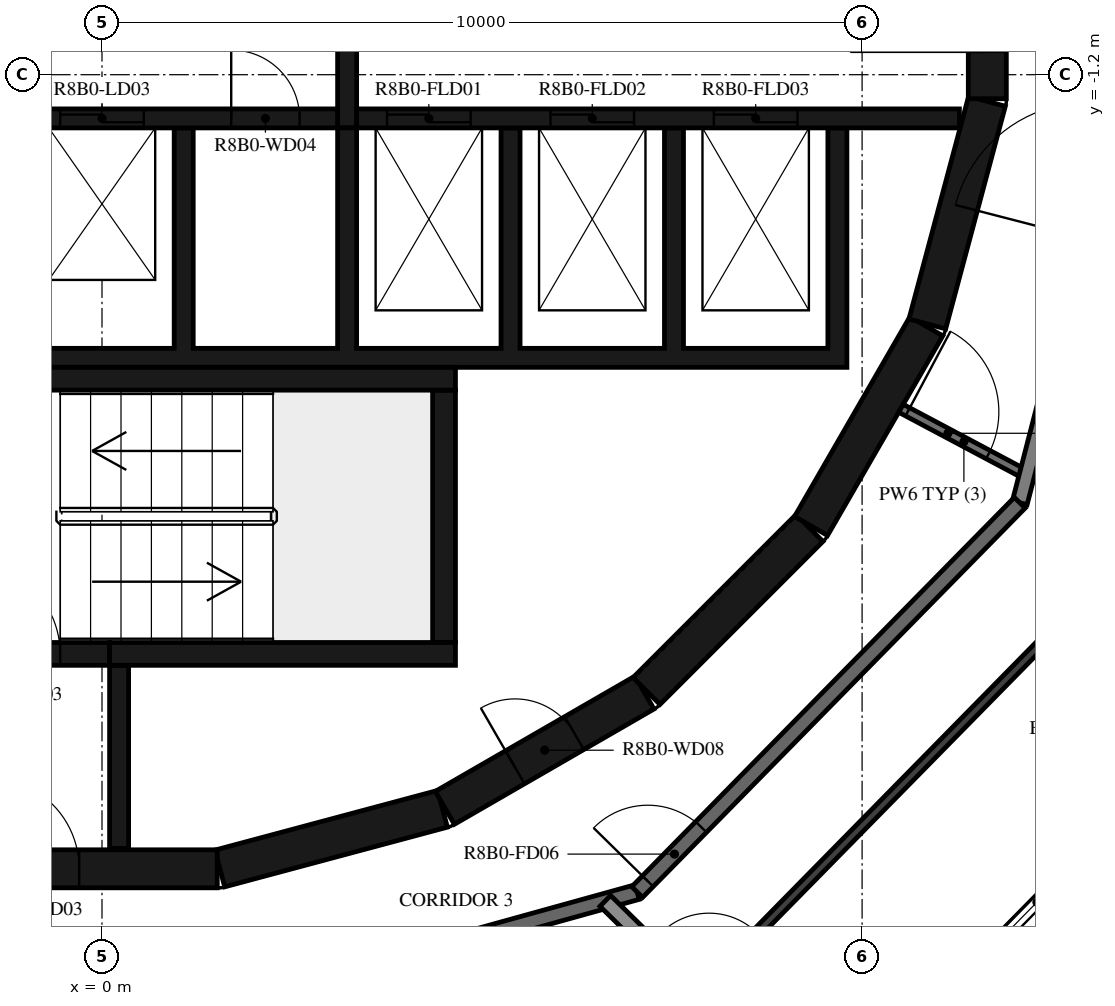
"""IFC4 building model, lengths in metres.
Left out: names, types, materials, properties, quantities, classifications, styles, units other than length and angle.
Written with IfcOpenShell. Run it as: python <this file> out.ifc"""

import sys

from ifc_helpers import new_model, si_unit, direction, frame, frame_2d, origin, place, context, subcontext, project, spatial, polyline, rectangle, outline, extrude, element, fill, save


model = new_model("IFC4")
c1 = context("Model", 3, precision=1e-05, world=origin(), true_north=direction((0.0, 1.0)))
c2 = subcontext(c1, "Body", "Model", "MODEL_VIEW")
j1 = project(units=[si_unit("LENGTHUNIT", "METRE"), si_unit("PLANEANGLEUNIT", "RADIAN")], contexts=[c1])
p1 = place(None, origin())
s1 = spatial("IfcSite", under=j1, at=p1, CompositionType="ELEMENT")
p2 = place(p1, origin())
s2 = spatial("IfcBuilding", under=s1, at=p2, CompositionType="ELEMENT")
p3 = place(p2, frame((0.0, 0.0, 312.2)))
s3 = spatial("IfcBuildingStorey", under=s2, at=p3, CompositionType="ELEMENT", Elevation=312.2)
p4 = place(p3, frame((1.55, -11.643, 0.0), z_axis=(0.0, 0.0, 1.0), x_axis=(0.965948410781, 0.258734743916, 0.0)))
e1 = element("IfcWall", 1, at=p4, inside=s3, PredefinedType="SHEAR", context=c2, shape_type="SweptSolid", body=[
    extrude(rectangle(XDim=3.033, YDim=0.5, at=frame_2d((1.516, 0.0))), origin(), (0.0, 0.0, 1.0), 3.12),
])
p5 = place(p3, frame((4.51, -10.845, 0.0), z_axis=(0.0, 0.0, 1.0), x_axis=(0.865975092491, 0.500087131594, 0.0)))
e2 = element("IfcWall", 2, at=p5, inside=s3, PredefinedType="SHEAR", context=c2, shape_type="SweptSolid", body=[
    extrude(rectangle(XDim=3.033, YDim=0.5, at=frame_2d((1.516, 0.0))), origin(), (0.0, 0.0, 1.0), 3.12),
])
p6 = place(p5, frame((1.066, 0.0, 0.0)))
e3 = element("IfcOpeningElement", 3, at=p6, cuts=e2, PredefinedType="OPENING", context=c2, shape_type="SweptSolid", body=[
    extrude(rectangle(XDim=0.9, YDim=2.1, at=frame_2d((0.45, 1.05))), frame((0.0, 0.26, 0.0), z_axis=(0.0, -1.0, 0.0), x_axis=(1.0, 0.0, 0.0)), (0.0, 0.0, 1.0), 0.52),
])
p7 = place(p3, frame((7.164, -9.308, 0.0), z_axis=(0.0, 0.0, 1.0), x_axis=(0.707106781187, 0.707106781187, 0.0)))
e4 = element("IfcWall", 4, at=p7, inside=s3, PredefinedType="SHEAR", context=c2, shape_type="SweptSolid", body=[
    extrude(rectangle(XDim=3.032, YDim=0.5, at=frame_2d((1.516, 0.0))), origin(), (0.0, 0.0, 1.0), 3.12),
])
for number, where, z_axis, x_axis in (
    (5, (9.329, -7.137, 0.0), (0.0, 0.0, 1.0), (0.5, 0.866, 0.0)),
    (6, (10.858, -4.479, 0.0), (0.0, 0.0, 1.0), (0.259, 0.966, 0.0)),
):
    element("IfcWall", number, at=place(p3, frame(where, z_axis=z_axis, x_axis=x_axis)), inside=s3, PredefinedType="SHEAR", context=c2, shape_type="SweptSolid", body=[
        extrude(rectangle(XDim=3.033, YDim=0.5, at=frame_2d((1.516, 0.0))), origin(), (0.0, 0.0, 1.0), 3.12),
    ])
p8 = place(p3, frame((11.647, -1.516, 0.0), z_axis=(0.0, 0.0, 1.0), x_axis=(0.0, 1.0, 0.0)))
e7 = element("IfcWall", 7, at=p8, inside=s3, PredefinedType="SHEAR", context=c2, shape_type="SweptSolid", body=[
    extrude(rectangle(XDim=3.033, YDim=0.5, at=frame_2d((1.516, 0.0))), origin(), (0.0, 0.0, 1.0), 3.12),
])
p9 = place(p8, frame((0.616, 0.0, 0.0)))
e8 = element("IfcOpeningElement", 8, at=p9, cuts=e7, PredefinedType="OPENING", context=c2, shape_type="SweptSolid", body=[
    extrude(rectangle(XDim=1.8, YDim=2.1, at=frame_2d((0.9, 1.05))), frame((0.0, 0.26, 0.0), z_axis=(0.0, -1.0, 0.0), x_axis=(1.0, 0.0, 0.0)), (0.0, 0.0, 1.0), 0.52),
])
p10 = place(p3, frame((-1.516, -11.647, 0.0), z_axis=(0.0, 0.0, 1.0), x_axis=(1.0, 0.0, 0.0)))
e9 = element("IfcWall", 9, at=p10, inside=s3, PredefinedType="SHEAR", context=c2, shape_type="SweptSolid", body=[
    extrude(rectangle(XDim=3.033, YDim=0.5, at=frame_2d((1.516, 0.0))), origin(), (0.0, 0.0, 1.0), 3.12),
])
p11 = place(p10, frame((0.016, 0.0, 0.0)))
e10 = element("IfcOpeningElement", 10, at=p11, cuts=e9, PredefinedType="OPENING", context=c2, shape_type="SweptSolid", body=[
    extrude(rectangle(XDim=1.2, YDim=2.1, at=frame_2d((0.6, 1.05))), frame((0.0, 0.26, 0.0), z_axis=(0.0, -1.0, 0.0), x_axis=(1.0, 0.0, 0.0)), (0.0, 0.0, 1.0), 0.52),
])
p12 = place(p3, frame((-2.4, -5.2, 0.0), z_axis=(0.0, 0.0, 1.0), x_axis=(1.0, 0.0, 0.0)))
e11 = element("IfcWall", 11, at=p12, inside=s3, PredefinedType="SHEAR", context=c2, shape_type="SweptSolid", body=[
    extrude(rectangle(XDim=7.05, YDim=0.3, at=frame_2d((3.525, 0.0))), origin(), (0.0, 0.0, 1.0), 3.12),
])
p13 = place(p3, frame((4.5, -8.67, 0.0), z_axis=(0.0, 0.0, 1.0), x_axis=(0.0, 1.0, 0.0)))
e12 = element("IfcWall", 12, at=p13, inside=s3, PredefinedType="SHEAR", context=c2, shape_type="SweptSolid", body=[
    extrude(rectangle(XDim=3.32, YDim=0.3, at=frame_2d((1.66, 0.0))), origin(), (0.0, 0.0, 1.0), 3.12),
])
p14 = place(p3, frame((0.1, -8.82, 0.0), z_axis=(0.0, 0.0, 1.0), x_axis=(1.0, 0.0, 0.0)))
e13 = element("IfcWall", 13, at=p14, inside=s3, PredefinedType="SHEAR", context=c2, shape_type="SweptSolid", body=[
    extrude(rectangle(XDim=4.55, YDim=0.3, at=frame_2d((2.275, 0.0))), origin(), (0.0, 0.0, 1.0), 3.12),
])
p15 = place(p3, frame((-2.4, -8.82, 0.0), z_axis=(0.0, 0.0, 1.0), x_axis=(1.0, 0.0, 0.0)))
e14 = element("IfcWall", 14, at=p15, inside=s3, PredefinedType="SHEAR", context=c2, shape_type="SweptSolid", body=[
    extrude(rectangle(XDim=2.5, YDim=0.3, at=frame_2d((1.25, 0.0))), origin(), (0.0, 0.0, 1.0), 3.12),
])
p16 = place(p15, frame((0.65, 0.0, 0.0)))
e15 = element("IfcOpeningElement", 15, at=p16, cuts=e14, PredefinedType="OPENING", context=c2, shape_type="SweptSolid", body=[
    extrude(rectangle(XDim=1.2, YDim=2.1, at=frame_2d((0.6, 1.05))), frame((0.0, 0.16, 0.0), z_axis=(0.0, -1.0, 0.0), x_axis=(1.0, 0.0, 0.0)), (0.0, 0.0, 1.0), 0.32),
])
p17 = place(p3, frame((0.225, -8.97, 0.0), z_axis=(0.0, 0.0, 1.0), x_axis=(0.0, -1.0, 0.0)))
e16 = element("IfcWall", 16, at=p17, inside=s3, PredefinedType="SHEAR", context=c2, shape_type="SweptSolid", body=[
    extrude(rectangle(XDim=2.41, YDim=0.25, at=frame_2d((1.205, 0.0))), origin(), (0.0, 0.0, 1.0), 3.12),
])
p18 = place(p3, origin())
e17 = element("IfcWall", 17, at=p18, inside=s3, PredefinedType="SHEAR", context=c2, shape_type="SweptSolid", body=[
    extrude(outline(polyline([(9.8, -5.05), (9.8, -4.8), (9.8, -1.9), (9.55, -1.9), (9.55, -4.8), (7.65, -4.8), (7.65, -1.9), (7.4, -1.9), (7.4, -4.8), (5.5, -4.8), (5.5, -1.9), (5.25, -1.9), (5.25, -4.8), (3.35, -4.8), (3.35, -1.9), (3.1, -1.9), (3.1, -4.8), (1.2, -4.8), (1.2, -1.9), (0.95, -1.9), (0.95, -4.8), (-0.95, -4.8), (-0.95, -1.9), (-1.2, -1.9), (-1.2, -4.8), (-3.1, -4.8), (-3.1, -1.9), (-3.35, -1.9), (-3.35, -4.8), (-5.25, -4.8), (-5.25, -1.9), (-5.5, -1.9), (-5.5, -4.8), (-9.55, -4.8), (-9.55, -1.9), (-9.8, -1.9), (-9.8, -4.8), (-9.8, -5.05), (9.8, -5.05)])), origin(), (0.0, 0.0, 1.0), 3.12),
])
p19 = place(p3, frame((-11.28, -1.775, 0.0), z_axis=(0.0, 0.0, 1.0), x_axis=(1.0, 0.0, 0.0)))
e18 = element("IfcWall", 18, at=p19, inside=s3, PredefinedType="SHEAR", context=c2, shape_type="SweptSolid", body=[
    extrude(rectangle(XDim=14.38, YDim=0.25, at=frame_2d((7.19, 0.0))), origin(), (0.0, 0.0, 1.0), 3.12),
])
p20 = place(p19, frame((6.43, 0.0, 0.0)))
e19 = element("IfcOpeningElement", 19, at=p20, cuts=e18, PredefinedType="OPENING", context=c2, shape_type="SweptSolid", body=[
    extrude(rectangle(XDim=1.1, YDim=2.1, at=frame_2d((0.55, 1.05))), frame((0.0, 0.135, 0.0), z_axis=(0.0, -1.0, 0.0), x_axis=(1.0, 0.0, 0.0)), (0.0, 0.0, 1.0), 0.27),
])
p21 = place(p19, frame((8.58, 0.0, 0.0)))
e20 = element("IfcOpeningElement", 20, at=p21, cuts=e18, PredefinedType="OPENING", context=c2, shape_type="SweptSolid", body=[
    extrude(rectangle(XDim=1.1, YDim=2.1, at=frame_2d((0.55, 1.05))), frame((0.0, 0.135, 0.0), z_axis=(0.0, -1.0, 0.0), x_axis=(1.0, 0.0, 0.0)), (0.0, 0.0, 1.0), 0.27),
])
p22 = place(p19, frame((10.73, 0.0, 0.0)))
e21 = element("IfcOpeningElement", 21, at=p22, cuts=e18, PredefinedType="OPENING", context=c2, shape_type="SweptSolid", body=[
    extrude(rectangle(XDim=1.1, YDim=2.1, at=frame_2d((0.55, 1.05))), frame((0.0, 0.135, 0.0), z_axis=(0.0, -1.0, 0.0), x_axis=(1.0, 0.0, 0.0)), (0.0, 0.0, 1.0), 0.27),
])
p23 = place(p19, frame((3.305, 0.0, 0.0)))
e22 = element("IfcOpeningElement", 22, at=p23, cuts=e18, PredefinedType="OPENING", context=c2, shape_type="SweptSolid", body=[
    extrude(rectangle(XDim=0.9, YDim=2.1, at=frame_2d((0.45, 1.05))), frame((0.0, 0.135, 0.0), z_axis=(0.0, -1.0, 0.0), x_axis=(1.0, 0.0, 0.0)), (0.0, 0.0, 1.0), 0.27),
])
p24 = place(p19, frame((12.98, 0.0, 0.0)))
e23 = element("IfcOpeningElement", 23, at=p24, cuts=e18, PredefinedType="OPENING", context=c2, shape_type="SweptSolid", body=[
    extrude(rectangle(XDim=0.9, YDim=2.1, at=frame_2d((0.45, 1.05))), frame((0.0, 0.135, 0.0), z_axis=(0.0, -1.0, 0.0), x_axis=(1.0, 0.0, 0.0)), (0.0, 0.0, 1.0), 0.27),
])
p25 = place(p3, frame((3.35, -1.775, 0.0), z_axis=(0.0, 0.0, 1.0), x_axis=(1.0, 0.0, 0.0)))
e24 = element("IfcWall", 24, at=p25, inside=s3, PredefinedType="SHEAR", context=c2, shape_type="SweptSolid", body=[
    extrude(rectangle(XDim=7.93, YDim=0.25, at=frame_2d((3.965, 0.0))), origin(), (0.0, 0.0, 1.0), 3.12),
])
p26 = place(p25, frame((0.4, 0.0, 0.0)))
e25 = element("IfcOpeningElement", 25, at=p26, cuts=e24, PredefinedType="OPENING", context=c2, shape_type="SweptSolid", body=[
    extrude(rectangle(XDim=1.1, YDim=2.4, at=frame_2d((0.55, 1.2))), frame((0.0, 0.135, 0.0), z_axis=(0.0, -1.0, 0.0), x_axis=(1.0, 0.0, 0.0)), (0.0, 0.0, 1.0), 0.27),
])
p27 = place(p25, frame((2.55, 0.0, 0.0)))
e26 = element("IfcOpeningElement", 26, at=p27, cuts=e24, PredefinedType="OPENING", context=c2, shape_type="SweptSolid", body=[
    extrude(rectangle(XDim=1.1, YDim=2.4, at=frame_2d((0.55, 1.2))), frame((0.0, 0.135, 0.0), z_axis=(0.0, -1.0, 0.0), x_axis=(1.0, 0.0, 0.0)), (0.0, 0.0, 1.0), 0.27),
])
p28 = place(p25, frame((4.7, 0.0, 0.0)))
e27 = element("IfcOpeningElement", 27, at=p28, cuts=e24, PredefinedType="OPENING", context=c2, shape_type="SweptSolid", body=[
    extrude(rectangle(XDim=1.1, YDim=2.4, at=frame_2d((0.55, 1.2))), frame((0.0, 0.135, 0.0), z_axis=(0.0, -1.0, 0.0), x_axis=(1.0, 0.0, 0.0)), (0.0, 0.0, 1.0), 0.27),
])
p29 = place(p3, frame((3.225, -1.9, 0.0), z_axis=(0.0, 0.0, 1.0), x_axis=(0.0, 1.0, 0.0)))
e28 = element("IfcWall", 28, at=p29, inside=s3, PredefinedType="SHEAR", context=c2, shape_type="SweptSolid", body=[
    extrude(rectangle(XDim=3.8, YDim=0.25, at=frame_2d((1.9, 0.0))), origin(), (0.0, 0.0, 1.0), 3.12),
])
p30 = place(p3, frame((10.511, -5.589, 0.0), z_axis=(0.0, 0.0, 1.0), x_axis=(0.882957311919, -0.469453283437, 0.0)))
e29 = element("IfcWall", 29, at=p30, inside=s3, PredefinedType="PARTITIONING", context=c2, shape_type="SweptSolid", body=[
    extrude(rectangle(XDim=1.876, YDim=0.12, at=frame_2d((0.938, 0.0))), origin(), (0.0, 0.0, 1.0), 3.12),
])
p31 = place(p30, frame((0.1, 0.0, 0.0)))
e30 = element("IfcOpeningElement", 30, at=p31, cuts=e29, PredefinedType="OPENING", context=c2, shape_type="SweptSolid", body=[
    extrude(rectangle(XDim=1.2, YDim=2.1, at=frame_2d((0.6, 1.05))), frame((0.0, 0.07, 0.0), z_axis=(0.0, -1.0, 0.0), x_axis=(1.0, 0.0, 0.0)), (0.0, 0.0, 1.0), 0.14),
])
p32 = place(p3, frame((12.074, -6.831, 0.0), z_axis=(0.0, 0.0, 1.0), x_axis=(0.250391063186, 0.968144780225, 0.0)))
e31 = element("IfcWall", 31, at=p32, inside=s3, PredefinedType="STANDARD", context=c2, shape_type="SweptSolid", body=[
    extrude(rectangle(XDim=7.181, YDim=0.2, at=frame_2d((3.591, 0.0))), origin(), (0.0, 0.0, 1.0), 3.12),
])
p33 = place(p32, frame((3.581, 0.0, 0.0)))
e32 = element("IfcOpeningElement", 32, at=p33, cuts=e31, PredefinedType="OPENING", context=c2, shape_type="SweptSolid", body=[
    extrude(rectangle(XDim=1.8, YDim=2.1, at=frame_2d((0.9, 1.05))), frame((0.0, 0.11, 0.0), z_axis=(0.0, -1.0, 0.0), x_axis=(1.0, 0.0, 0.0)), (0.0, 0.0, 1.0), 0.22),
])
p34 = place(p3, frame((-6.831, -12.074, 0.0), z_axis=(0.0, 0.0, 1.0), x_axis=(0.968144780225, -0.250391063186, 0.0)))
e33 = element("IfcWall", 33, at=p34, inside=s3, PredefinedType="STANDARD", context=c2, shape_type="SweptSolid", body=[
    extrude(rectangle(XDim=7.181, YDim=0.2, at=frame_2d((3.591, 0.0))), origin(), (0.0, 0.0, 1.0), 3.12),
])
p35 = place(p34, frame((2.39, 0.0, 0.0)))
e34 = element("IfcOpeningElement", 34, at=p35, cuts=e33, PredefinedType="OPENING", context=c2, shape_type="SweptSolid", body=[
    extrude(rectangle(XDim=1.0, YDim=2.1, at=frame_2d((0.5, 1.05))), frame((0.0, 0.11, 0.0), z_axis=(0.0, -1.0, 0.0), x_axis=(1.0, 0.0, 0.0)), (0.0, 0.0, 1.0), 0.22),
])
p36 = place(p34, frame((5.69, 0.0, 0.0)))
e35 = element("IfcOpeningElement", 35, at=p36, cuts=e33, PredefinedType="OPENING", context=c2, shape_type="SweptSolid", body=[
    extrude(rectangle(XDim=1.0, YDim=2.1, at=frame_2d((0.5, 1.05))), frame((0.0, 0.11, 0.0), z_axis=(0.0, -1.0, 0.0), x_axis=(1.0, 0.0, 0.0)), (0.0, 0.0, 1.0), 0.22),
])
p37 = place(p3, frame((0.121, -13.872, 0.0), z_axis=(0.0, 0.0, 1.0), x_axis=(0.963625960674, 0.267254575108, 0.0)))
e36 = element("IfcWall", 36, at=p37, inside=s3, PredefinedType="STANDARD", context=c2, shape_type="SweptSolid", body=[
    extrude(rectangle(XDim=7.181, YDim=0.2, at=frame_2d((3.591, 0.0))), origin(), (0.0, 0.0, 1.0), 3.12),
])
p38 = place(p3, frame((7.041, -11.953, 0.0), z_axis=(0.0, 0.0, 1.0), x_axis=(0.70090916255, 0.713250549143, 0.0)))
e37 = element("IfcWall", 37, at=p38, inside=s3, PredefinedType="STANDARD", context=c2, shape_type="SweptSolid", body=[
    extrude(rectangle(XDim=7.181, YDim=0.2, at=frame_2d((3.59, 0.0))), origin(), (0.0, 0.0, 1.0), 3.12),
])
p39 = place(p38, frame((0.2, 0.0, 0.0)))
e38 = element("IfcOpeningElement", 38, at=p39, cuts=e37, PredefinedType="OPENING", context=c2, shape_type="SweptSolid", body=[
    extrude(rectangle(XDim=1.0, YDim=2.1, at=frame_2d((0.5, 1.05))), frame((0.0, 0.11, 0.0), z_axis=(0.0, -1.0, 0.0), x_axis=(1.0, 0.0, 0.0)), (0.0, 0.0, 1.0), 0.22),
])
p40 = place(p3, frame((9.462, -14.861, 0.0), z_axis=(0.0, 0.0, 1.0), x_axis=(-0.713302018318, 0.700856783276, 0.0)))
e39 = element("IfcWall", 39, at=p40, inside=s3, PredefinedType="STANDARD", context=c2, shape_type="SweptSolid", body=[
    extrude(rectangle(XDim=3.982, YDim=0.2, at=frame_2d((1.991, 0.0))), origin(), (0.0, 0.0, 1.0), 2.73),
])
p41 = place(p3, frame((7.846, -13.273, 0.0), z_axis=(0.0, 0.0, 1.0), x_axis=(0.700915117659, 0.713244697027, 0.0)))
e40 = element("IfcWall", 40, at=p41, inside=s3, PredefinedType="PARTITIONING", context=c2, shape_type="SweptSolid", body=[
    extrude(rectangle(XDim=7.96, YDim=0.12, at=frame_2d((3.98, 0.0))), origin(), (0.0, 0.0, 1.0), 3.12),
])
p42 = place(p41, frame((0.2, 0.0, 0.0)))
e41 = element("IfcOpeningElement", 41, at=p42, cuts=e40, PredefinedType="OPENING", context=c2, shape_type="SweptSolid", body=[
    extrude(rectangle(XDim=0.9, YDim=2.1, at=frame_2d((0.45, 1.05))), frame((0.0, 0.07, 0.0), z_axis=(0.0, -1.0, 0.0), x_axis=(1.0, 0.0, 0.0)), (0.0, 0.0, 1.0), 0.14),
])
p43 = place(p16, origin())
e42 = element("IfcDoor", 42, at=p43, inside=s3, OperationType="SINGLE_SWING_LEFT", PredefinedType="DOOR", context=c2, shape_type="SweptSolid", body=[
    extrude(rectangle(XDim=1.2, YDim=2.1, at=frame_2d((0.6, 1.05))), frame((0.0, 0.025, 0.0), z_axis=(0.0, -1.0, 0.0), x_axis=(1.0, 0.0, 0.0)), (0.0, 0.0, 1.0), 0.05),
])
fill(e15, e42)
p44 = place(p11, origin())
e43 = element("IfcDoor", 43, at=p44, inside=s3, OperationType="SINGLE_SWING_RIGHT", PredefinedType="DOOR", context=c2, shape_type="SweptSolid", body=[
    extrude(rectangle(XDim=1.2, YDim=2.1, at=frame_2d((0.6, 1.05))), frame((0.0, 0.025, 0.0), z_axis=(0.0, -1.0, 0.0), x_axis=(1.0, 0.0, 0.0)), (0.0, 0.0, 1.0), 0.05),
])
fill(e10, e43)
p45 = place(p9, origin())
e44 = element("IfcDoor", 44, at=p45, inside=s3, OperationType="DOUBLE_DOOR_SINGLE_SWING", PredefinedType="DOOR", context=c2, shape_type="SweptSolid", body=[
    extrude(rectangle(XDim=1.8, YDim=2.1, at=frame_2d((0.9, 1.05))), frame((0.0, 0.025, 0.0), z_axis=(0.0, -1.0, 0.0), x_axis=(1.0, 0.0, 0.0)), (0.0, 0.0, 1.0), 0.05),
])
fill(e8, e44)
p46 = place(p22, origin())
e45 = element("IfcDoor", 45, at=p46, inside=s3, OperationType="DOUBLE_DOOR_SLIDING", PredefinedType="DOOR", context=c2, shape_type="SweptSolid", body=[
    extrude(rectangle(XDim=1.1, YDim=2.1, at=frame_2d((0.55, 1.05))), frame((0.0, 0.025, 0.0), z_axis=(0.0, -1.0, 0.0), x_axis=(1.0, 0.0, 0.0)), (0.0, 0.0, 1.0), 0.05),
])
fill(e21, e45)
p47 = place(p26, origin())
e46 = element("IfcDoor", 46, at=p47, inside=s3, OperationType="DOUBLE_DOOR_SLIDING", PredefinedType="DOOR", context=c2, shape_type="SweptSolid", body=[
    extrude(rectangle(XDim=1.1, YDim=2.4, at=frame_2d((0.55, 1.2))), frame((0.0, 0.025, 0.0), z_axis=(0.0, -1.0, 0.0), x_axis=(1.0, 0.0, 0.0)), (0.0, 0.0, 1.0), 0.05),
])
fill(e25, e46)
p48 = place(p27, origin())
e47 = element("IfcDoor", 47, at=p48, inside=s3, OperationType="DOUBLE_DOOR_SLIDING", PredefinedType="DOOR", context=c2, shape_type="SweptSolid", body=[
    extrude(rectangle(XDim=1.1, YDim=2.4, at=frame_2d((0.55, 1.2))), frame((0.0, 0.025, 0.0), z_axis=(0.0, -1.0, 0.0), x_axis=(1.0, 0.0, 0.0)), (0.0, 0.0, 1.0), 0.05),
])
fill(e26, e47)
p49 = place(p28, origin())
e48 = element("IfcDoor", 48, at=p49, inside=s3, OperationType="DOUBLE_DOOR_SLIDING", PredefinedType="DOOR", context=c2, shape_type="SweptSolid", body=[
    extrude(rectangle(XDim=1.1, YDim=2.4, at=frame_2d((0.55, 1.2))), frame((0.0, 0.025, 0.0), z_axis=(0.0, -1.0, 0.0), x_axis=(1.0, 0.0, 0.0)), (0.0, 0.0, 1.0), 0.05),
])
fill(e27, e48)
p50 = place(p24, origin())
e49 = element("IfcDoor", 49, at=p50, inside=s3, OperationType="SINGLE_SWING_RIGHT", PredefinedType="DOOR", context=c2, shape_type="SweptSolid", body=[
    extrude(rectangle(XDim=0.9, YDim=2.1, at=frame_2d((0.45, 1.05))), frame((0.0, 0.025, 0.0), z_axis=(0.0, -1.0, 0.0), x_axis=(1.0, 0.0, 0.0)), (0.0, 0.0, 1.0), 0.05),
])
fill(e23, e49)
p51 = place(p6, origin())
e50 = element("IfcDoor", 50, at=p51, inside=s3, OperationType="SINGLE_SWING_RIGHT", PredefinedType="DOOR", context=c2, shape_type="SweptSolid", body=[
    extrude(rectangle(XDim=0.9, YDim=2.1, at=frame_2d((0.45, 1.05))), frame((0.0, 0.025, 0.0), z_axis=(0.0, -1.0, 0.0), x_axis=(1.0, 0.0, 0.0)), (0.0, 0.0, 1.0), 0.05),
])
fill(e3, e50)
p52 = place(p39, origin())
e51 = element("IfcDoor", 51, at=p52, inside=s3, OperationType="SINGLE_SWING_LEFT", PredefinedType="DOOR", context=c2, shape_type="SweptSolid", body=[
    extrude(rectangle(XDim=1.0, YDim=2.1, at=frame_2d((0.5, 1.05))), frame((0.0, 0.025, 0.0), z_axis=(0.0, -1.0, 0.0), x_axis=(1.0, 0.0, 0.0)), (0.0, 0.0, 1.0), 0.05),
])
fill(e38, e51)
p53 = place(p31, origin())
e52 = element("IfcDoor", 52, at=p53, inside=s3, OperationType="DOUBLE_DOOR_SINGLE_SWING", PredefinedType="DOOR", context=c2, shape_type="SweptSolid", body=[
    extrude(rectangle(XDim=1.2, YDim=2.1, at=frame_2d((0.6, 1.05))), frame((0.0, 0.025, 0.0), z_axis=(0.0, -1.0, 0.0), x_axis=(1.0, 0.0, 0.0)), (0.0, 0.0, 1.0), 0.05),
])
fill(e30, e52)
save(model, sys.argv[1])
